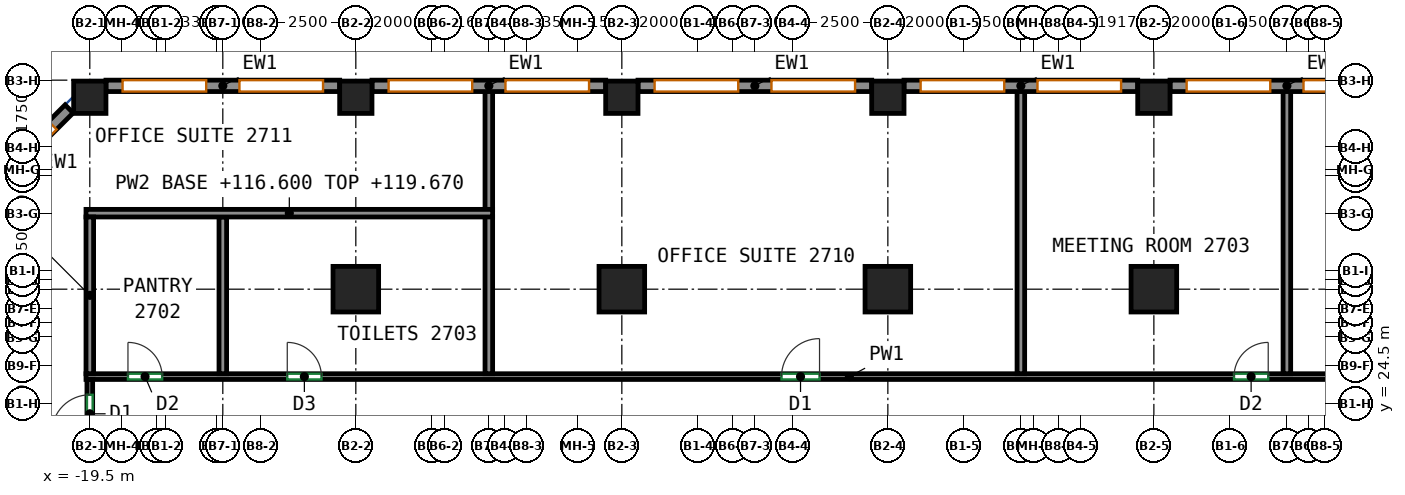
"""IFC4 building model, lengths in metres.
Left out: names, types, materials, properties, quantities, classifications, styles, units other than length and angle.
Written with IfcOpenShell. Run it as: python <this file> out.ifc"""

import sys

from ifc_helpers import new_model, si_unit, direction, frame, frame_2d, origin, origin_2d, place, context, subcontext, project, spatial, rectangle, extrude, source, transform, mapped, element, fill, save


model = new_model("IFC4")
c1 = context("Model", 3, precision=1e-05, world=origin(), true_north=direction((0.0, 1.0)))
c2 = subcontext(c1, "Body", "Model", "MODEL_VIEW")
j1 = project(units=[si_unit("LENGTHUNIT", "METRE"), si_unit("PLANEANGLEUNIT", "RADIAN")], contexts=[c1])
p1 = place(None, origin())
s1 = spatial("IfcSite", under=j1, at=p1, CompositionType="ELEMENT")
p2 = place(p1, origin())
s2 = spatial("IfcBuilding", under=s1, at=p2, CompositionType="ELEMENT")
p3 = place(p2, frame((0.0, 0.0, 116.6)))
s3 = spatial("IfcBuildingStorey", under=s2, at=p3, CompositionType="ELEMENT", Elevation=116.6)
m1 = source(origin(), c2, "Body", "SweptSolid", [
    extrude(rectangle(XDim=0.85, YDim=0.85, at=origin_2d()), origin(), (0.0, 0.0, 1.0), 3.72),
])
p4 = place(p3, frame((-19.5, 32.55, 0.0), z_axis=(0.0, 0.0, 1.0), x_axis=(1.0, 0.0, 0.0)))
e1 = element("IfcColumn", 1, at=p4, inside=s3, PredefinedType="COLUMN", context=c2, shape_type="MappedRepresentation", body=[
    mapped(m1, transform((0.0, 0.0, 0.0))),
])
m2 = source(origin(), c2, "Body", "SweptSolid", [
    extrude(rectangle(XDim=1.2, YDim=1.2, at=origin_2d()), origin(), (0.0, 0.0, 1.0), 3.72),
])
p5 = place(p3, frame((-12.5, 27.5, 0.0), z_axis=(0.0, 0.0, 1.0), x_axis=(1.0, 0.0, 0.0)))
e2 = element("IfcColumn", 2, at=p5, inside=s3, PredefinedType="COLUMN", context=c2, shape_type="MappedRepresentation", body=[
    mapped(m2, transform((0.0, 0.0, 0.0))),
])
p6 = place(p3, frame((-12.5, 32.55, 0.0), z_axis=(0.0, 0.0, 1.0), x_axis=(1.0, 0.0, 0.0)))
e3 = element("IfcColumn", 3, at=p6, inside=s3, PredefinedType="COLUMN", context=c2, shape_type="MappedRepresentation", body=[
    mapped(m1, transform((0.0, 0.0, 0.0))),
])
p7 = place(p3, frame((-5.5, 27.5, 0.0), z_axis=(0.0, 0.0, 1.0), x_axis=(1.0, 0.0, 0.0)))
e4 = element("IfcColumn", 4, at=p7, inside=s3, PredefinedType="COLUMN", context=c2, shape_type="MappedRepresentation", body=[
    mapped(m2, transform((0.0, 0.0, 0.0))),
])
p8 = place(p3, frame((-5.5, 32.55, 0.0), z_axis=(0.0, 0.0, 1.0), x_axis=(1.0, 0.0, 0.0)))
e5 = element("IfcColumn", 5, at=p8, inside=s3, PredefinedType="COLUMN", context=c2, shape_type="MappedRepresentation", body=[
    mapped(m1, transform((0.0, 0.0, 0.0))),
])
p9 = place(p3, frame((1.5, 27.5, 0.0), z_axis=(0.0, 0.0, 1.0), x_axis=(1.0, 0.0, 0.0)))
e6 = element("IfcColumn", 6, at=p9, inside=s3, PredefinedType="COLUMN", context=c2, shape_type="MappedRepresentation", body=[
    mapped(m2, transform((0.0, 0.0, 0.0))),
])
p10 = place(p3, frame((1.5, 32.55, 0.0), z_axis=(0.0, 0.0, 1.0), x_axis=(1.0, 0.0, 0.0)))
e7 = element("IfcColumn", 7, at=p10, inside=s3, PredefinedType="COLUMN", context=c2, shape_type="MappedRepresentation", body=[
    mapped(m1, transform((0.0, 0.0, 0.0))),
])
p11 = place(p3, frame((8.5, 27.5, 0.0), z_axis=(0.0, 0.0, 1.0), x_axis=(1.0, 0.0, 0.0)))
e8 = element("IfcColumn", 8, at=p11, inside=s3, PredefinedType="COLUMN", context=c2, shape_type="MappedRepresentation", body=[
    mapped(m2, transform((0.0, 0.0, 0.0))),
])
p12 = place(p3, frame((8.5, 32.55, 0.0), z_axis=(0.0, 0.0, 1.0), x_axis=(1.0, 0.0, 0.0)))
e9 = element("IfcColumn", 9, at=p12, inside=s3, PredefinedType="COLUMN", context=c2, shape_type="MappedRepresentation", body=[
    mapped(m1, transform((0.0, 0.0, 0.0))),
])
m3 = source(origin(), c2, "Body", "SweptSolid", [
    extrude(rectangle(XDim=6.15, YDim=0.3, at=frame_2d((3.075, 0.0))), origin(), (0.0, 0.0, 1.0), 3.72),
])
p13 = place(p3, frame((15.075, 32.85, 0.0), z_axis=(0.0, 0.0, 1.0), x_axis=(-1.0, 0.0, 0.0)))
e10 = element("IfcWall", 10, at=p13, inside=s3, PredefinedType="SOLIDWALL", context=c2, shape_type="MappedRepresentation", body=[
    mapped(m3, transform((0.0, 0.0, 0.0))),
])
p14 = place(p13, frame((0.438, 0.0, 0.7)))
e11 = element("IfcOpeningElement", 11, at=p14, cuts=e10, PredefinedType="OPENING", context=c2, shape_type="SweptSolid", body=[
    extrude(rectangle(XDim=2.2, YDim=2.25, at=frame_2d((1.1, 1.125))), frame((0.0, 0.16, 0.0), z_axis=(0.0, -1.0, 0.0), x_axis=(1.0, 0.0, 0.0)), (0.0, 0.0, 1.0), 0.32),
])
p15 = place(p13, frame((3.512, 0.0, 0.7)))
e12 = element("IfcOpeningElement", 12, at=p15, cuts=e10, PredefinedType="OPENING", context=c2, shape_type="SweptSolid", body=[
    extrude(rectangle(XDim=2.2, YDim=2.25, at=frame_2d((1.1, 1.125))), frame((0.0, 0.16, 0.0), z_axis=(0.0, -1.0, 0.0), x_axis=(1.0, 0.0, 0.0)), (0.0, 0.0, 1.0), 0.32),
])
p16 = place(p3, frame((8.075, 32.85, 0.0), z_axis=(0.0, 0.0, 1.0), x_axis=(-1.0, 0.0, 0.0)))
e13 = element("IfcWall", 13, at=p16, inside=s3, PredefinedType="SOLIDWALL", context=c2, shape_type="MappedRepresentation", body=[
    mapped(m3, transform((0.0, 0.0, 0.0))),
])
p17 = place(p16, frame((0.438, 0.0, 0.7)))
e14 = element("IfcOpeningElement", 14, at=p17, cuts=e13, PredefinedType="OPENING", context=c2, shape_type="SweptSolid", body=[
    extrude(rectangle(XDim=2.2, YDim=2.25, at=frame_2d((1.1, 1.125))), frame((0.0, 0.16, 0.0), z_axis=(0.0, -1.0, 0.0), x_axis=(1.0, 0.0, 0.0)), (0.0, 0.0, 1.0), 0.32),
])
p18 = place(p16, frame((3.512, 0.0, 0.7)))
e15 = element("IfcOpeningElement", 15, at=p18, cuts=e13, PredefinedType="OPENING", context=c2, shape_type="SweptSolid", body=[
    extrude(rectangle(XDim=2.2, YDim=2.25, at=frame_2d((1.1, 1.125))), frame((0.0, 0.16, 0.0), z_axis=(0.0, -1.0, 0.0), x_axis=(1.0, 0.0, 0.0)), (0.0, 0.0, 1.0), 0.32),
])
p19 = place(p3, frame((1.075, 32.85, 0.0), z_axis=(0.0, 0.0, 1.0), x_axis=(-1.0, 0.0, 0.0)))
e16 = element("IfcWall", 16, at=p19, inside=s3, PredefinedType="SOLIDWALL", context=c2, shape_type="MappedRepresentation", body=[
    mapped(m3, transform((0.0, 0.0, 0.0))),
])
p20 = place(p19, frame((0.438, 0.0, 0.7)))
e17 = element("IfcOpeningElement", 17, at=p20, cuts=e16, PredefinedType="OPENING", context=c2, shape_type="SweptSolid", body=[
    extrude(rectangle(XDim=2.2, YDim=2.25, at=frame_2d((1.1, 1.125))), frame((0.0, 0.16, 0.0), z_axis=(0.0, -1.0, 0.0), x_axis=(1.0, 0.0, 0.0)), (0.0, 0.0, 1.0), 0.32),
])
p21 = place(p19, frame((3.512, 0.0, 0.7)))
e18 = element("IfcOpeningElement", 18, at=p21, cuts=e16, PredefinedType="OPENING", context=c2, shape_type="SweptSolid", body=[
    extrude(rectangle(XDim=2.2, YDim=2.25, at=frame_2d((1.1, 1.125))), frame((0.0, 0.16, 0.0), z_axis=(0.0, -1.0, 0.0), x_axis=(1.0, 0.0, 0.0)), (0.0, 0.0, 1.0), 0.32),
])
p22 = place(p3, frame((-5.925, 32.85, 0.0), z_axis=(0.0, 0.0, 1.0), x_axis=(-1.0, 0.0, 0.0)))
e19 = element("IfcWall", 19, at=p22, inside=s3, PredefinedType="SOLIDWALL", context=c2, shape_type="MappedRepresentation", body=[
    mapped(m3, transform((0.0, 0.0, 0.0))),
])
p23 = place(p22, frame((0.438, 0.0, 0.7)))
e20 = element("IfcOpeningElement", 20, at=p23, cuts=e19, PredefinedType="OPENING", context=c2, shape_type="SweptSolid", body=[
    extrude(rectangle(XDim=2.2, YDim=2.25, at=frame_2d((1.1, 1.125))), frame((0.0, 0.16, 0.0), z_axis=(0.0, -1.0, 0.0), x_axis=(1.0, 0.0, 0.0)), (0.0, 0.0, 1.0), 0.32),
])
p24 = place(p22, frame((3.512, 0.0, 0.7)))
e21 = element("IfcOpeningElement", 21, at=p24, cuts=e19, PredefinedType="OPENING", context=c2, shape_type="SweptSolid", body=[
    extrude(rectangle(XDim=2.2, YDim=2.25, at=frame_2d((1.1, 1.125))), frame((0.0, 0.16, 0.0), z_axis=(0.0, -1.0, 0.0), x_axis=(1.0, 0.0, 0.0)), (0.0, 0.0, 1.0), 0.32),
])
p25 = place(p3, frame((-12.925, 32.85, 0.0), z_axis=(0.0, 0.0, 1.0), x_axis=(-1.0, 0.0, 0.0)))
e22 = element("IfcWall", 22, at=p25, inside=s3, PredefinedType="SOLIDWALL", context=c2, shape_type="MappedRepresentation", body=[
    mapped(m3, transform((0.0, 0.0, 0.0))),
])
p26 = place(p25, frame((0.438, 0.0, 0.7)))
e23 = element("IfcOpeningElement", 23, at=p26, cuts=e22, PredefinedType="OPENING", context=c2, shape_type="SweptSolid", body=[
    extrude(rectangle(XDim=2.2, YDim=2.25, at=frame_2d((1.1, 1.125))), frame((0.0, 0.16, 0.0), z_axis=(0.0, -1.0, 0.0), x_axis=(1.0, 0.0, 0.0)), (0.0, 0.0, 1.0), 0.32),
])
p27 = place(p25, frame((3.512, 0.0, 0.7)))
e24 = element("IfcOpeningElement", 24, at=p27, cuts=e22, PredefinedType="OPENING", context=c2, shape_type="SweptSolid", body=[
    extrude(rectangle(XDim=2.2, YDim=2.25, at=frame_2d((1.1, 1.125))), frame((0.0, 0.16, 0.0), z_axis=(0.0, -1.0, 0.0), x_axis=(1.0, 0.0, 0.0)), (0.0, 0.0, 1.0), 0.32),
])
m4 = source(origin(), c2, "Body", "SweptSolid", [
    extrude(rectangle(XDim=3.429, YDim=0.3, at=frame_2d((1.715, 0.0))), origin(), (0.0, 0.0, 1.0), 3.72),
])
p28 = place(p3, frame((-20.044, 32.244, 0.0), z_axis=(0.0, 0.0, 1.0), x_axis=(-0.707106781187, -0.707106781187, 0.0)))
e25 = element("IfcWall", 25, at=p28, inside=s3, PredefinedType="SOLIDWALL", context=c2, shape_type="MappedRepresentation", body=[
    mapped(m4, transform((0.0, 0.0, 0.0))),
])
p29 = place(p28, frame((0.615, 0.0, 0.7)))
e26 = element("IfcOpeningElement", 26, at=p29, cuts=e25, PredefinedType="OPENING", context=c2, shape_type="SweptSolid", body=[
    extrude(rectangle(XDim=2.2, YDim=2.25, at=frame_2d((1.1, 1.125))), frame((0.0, 0.16, 0.0), z_axis=(0.0, -1.0, 0.0), x_axis=(1.0, 0.0, 0.0)), (0.0, 0.0, 1.0), 0.32),
])
p30 = place(p3, frame((-19.6, 25.2, 0.0), z_axis=(0.0, 0.0, 1.0), x_axis=(1.0, 0.0, 0.0)))
e27 = element("IfcWall", 27, at=p30, inside=s3, PredefinedType="PARTITIONING", context=c2, shape_type="SweptSolid", body=[
    extrude(rectangle(XDim=40.175, YDim=0.15, at=frame_2d((20.087, 0.0))), origin(), (0.0, 0.0, 1.0), 3.72),
])
p31 = place(p30, frame((1.104, 0.0, 0.0)))
e28 = element("IfcOpeningElement", 28, at=p31, cuts=e27, PredefinedType="OPENING", context=c2, shape_type="SweptSolid", body=[
    extrude(rectangle(XDim=0.9, YDim=2.1, at=frame_2d((0.45, 1.05))), frame((0.0, 0.085, 0.0), z_axis=(0.0, -1.0, 0.0), x_axis=(1.0, 0.0, 0.0)), (0.0, 0.0, 1.0), 0.17),
])
p32 = place(p30, frame((5.296, 0.0, 0.0)))
e29 = element("IfcOpeningElement", 29, at=p32, cuts=e27, PredefinedType="OPENING", context=c2, shape_type="SweptSolid", body=[
    extrude(rectangle(XDim=0.9, YDim=2.1, at=frame_2d((0.45, 1.05))), frame((0.0, 0.085, 0.0), z_axis=(0.0, -1.0, 0.0), x_axis=(1.0, 0.0, 0.0)), (0.0, 0.0, 1.0), 0.17),
])
p33 = place(p30, frame((18.302, 0.0, 0.0)))
e30 = element("IfcOpeningElement", 30, at=p33, cuts=e27, PredefinedType="OPENING", context=c2, shape_type="SweptSolid", body=[
    extrude(rectangle(XDim=1.0, YDim=2.1, at=frame_2d((0.5, 1.05))), frame((0.0, 0.085, 0.0), z_axis=(0.0, -1.0, 0.0), x_axis=(1.0, 0.0, 0.0)), (0.0, 0.0, 1.0), 0.17),
])
p34 = place(p30, frame((30.209, 0.0, 0.0)))
e31 = element("IfcOpeningElement", 31, at=p34, cuts=e27, PredefinedType="OPENING", context=c2, shape_type="SweptSolid", body=[
    extrude(rectangle(XDim=0.9, YDim=2.1, at=frame_2d((0.45, 1.05))), frame((0.0, 0.085, 0.0), z_axis=(0.0, -1.0, 0.0), x_axis=(1.0, 0.0, 0.0)), (0.0, 0.0, 1.0), 0.17),
])
p35 = place(p30, frame((32.702, 0.0, 0.0)))
e32 = element("IfcOpeningElement", 32, at=p35, cuts=e27, PredefinedType="OPENING", context=c2, shape_type="SweptSolid", body=[
    extrude(rectangle(XDim=1.8, YDim=2.1, at=frame_2d((0.9, 1.05))), frame((0.0, 0.085, 0.0), z_axis=(0.0, -1.0, 0.0), x_axis=(1.0, 0.0, 0.0)), (0.0, 0.0, 1.0), 0.17),
])
p36 = place(p3, frame((-19.5, 22.09, 0.0), z_axis=(0.0, 0.0, 1.0), x_axis=(0.0, 1.0, 0.0)))
e33 = element("IfcWall", 33, at=p36, inside=s3, PredefinedType="PARTITIONING", context=c2, shape_type="SweptSolid", body=[
    extrude(rectangle(XDim=3.035, YDim=0.15, at=frame_2d((1.518, 0.0))), origin(), (0.0, 0.0, 1.0), 3.07),
])
p37 = place(p36, frame((1.631, 0.0, 0.0)))
e34 = element("IfcOpeningElement", 34, at=p37, cuts=e33, PredefinedType="OPENING", context=c2, shape_type="SweptSolid", body=[
    extrude(rectangle(XDim=1.0, YDim=2.1, at=frame_2d((0.5, 1.05))), frame((0.0, 0.085, 0.0), z_axis=(0.0, -1.0, 0.0), x_axis=(1.0, 0.0, 0.0)), (0.0, 0.0, 1.0), 0.17),
])
for number, where, z_axis, x_axis in (
    (35, (12.0, 25.276, 0.0), (0.0, 0.0, 1.0), (0.0, 1.0, 0.0)),
    (36, (5.0, 25.276, 0.0), (0.0, 0.0, 1.0), (0.0, 1.0, 0.0)),
):
    element("IfcWall", number, at=place(p3, frame(where, z_axis=z_axis, x_axis=x_axis)), inside=s3, PredefinedType="PARTITIONING", context=c2, shape_type="SweptSolid", body=[
        extrude(rectangle(XDim=7.474, YDim=0.2, at=frame_2d((3.737, 0.0))), origin(), (0.0, 0.0, 1.0), 3.72),
    ])
p38 = place(p3, frame((-9.0, 25.276, 0.0), z_axis=(0.0, 0.0, 1.0), x_axis=(0.0, 1.0, 0.0)))
e37 = element("IfcWall", 37, at=p38, inside=s3, PredefinedType="PARTITIONING", context=c2, shape_type="SweptSolid", body=[
    extrude(rectangle(XDim=4.134, YDim=0.2, at=frame_2d((2.067, 0.0))), origin(), (0.0, 0.0, 1.0), 3.72),
])
p39 = place(p3, frame((-9.0, 29.59, 0.0), z_axis=(0.0, 0.0, 1.0), x_axis=(0.0, 1.0, 0.0)))
e38 = element("IfcWall", 38, at=p39, inside=s3, PredefinedType="PARTITIONING", context=c2, shape_type="SweptSolid", body=[
    extrude(rectangle(XDim=3.16, YDim=0.2, at=frame_2d((1.58, 0.0))), origin(), (0.0, 0.0, 1.0), 3.72),
])
p40 = place(p3, frame((-16.0, 29.4, 0.0), z_axis=(0.0, 0.0, 1.0), x_axis=(0.0, -1.0, 0.0)))
e39 = element("IfcWall", 39, at=p40, inside=s3, PredefinedType="PARTITIONING", context=c2, shape_type="SweptSolid", body=[
    extrude(rectangle(XDim=4.124, YDim=0.2, at=frame_2d((2.062, 0.0))), origin(), (0.0, 0.0, 1.0), 3.72),
])
p41 = place(p3, frame((-19.6, 29.5, 0.0), z_axis=(0.0, 0.0, 1.0), x_axis=(1.0, 0.0, 0.0)))
e40 = element("IfcWall", 40, at=p41, inside=s3, PredefinedType="PARTITIONING", context=c2, shape_type="SweptSolid", body=[
    extrude(rectangle(XDim=10.7, YDim=0.2, at=frame_2d((5.35, 0.0))), origin(), (0.0, 0.0, 1.0), 3.07),
])
p42 = place(p3, frame((-19.5, 29.4, 0.0), z_axis=(0.0, 0.0, 1.0), x_axis=(0.0, -1.0, 0.0)))
e41 = element("IfcWall", 41, at=p42, inside=s3, PredefinedType="PARTITIONING", context=c2, shape_type="SweptSolid", body=[
    extrude(rectangle(XDim=4.124, YDim=0.2, at=frame_2d((2.062, 0.0))), origin(), (0.0, 0.0, 1.0), 3.07),
])
p43 = place(p14, origin())
e42 = element("IfcWindow", 42, at=p43, inside=s3, PartitioningType="SINGLE_PANEL", PredefinedType="WINDOW", context=c2, shape_type="SweptSolid", body=[
    extrude(rectangle(XDim=2.2, YDim=2.25, at=frame_2d((1.1, 1.125))), frame((0.0, 0.03, 0.0), z_axis=(0.0, -1.0, 0.0), x_axis=(1.0, 0.0, 0.0)), (0.0, 0.0, 1.0), 0.06),
])
fill(e11, e42)
p44 = place(p15, origin())
e43 = element("IfcWindow", 43, at=p44, inside=s3, PartitioningType="SINGLE_PANEL", PredefinedType="WINDOW", context=c2, shape_type="SweptSolid", body=[
    extrude(rectangle(XDim=2.2, YDim=2.25, at=frame_2d((1.1, 1.125))), frame((0.0, 0.03, 0.0), z_axis=(0.0, -1.0, 0.0), x_axis=(1.0, 0.0, 0.0)), (0.0, 0.0, 1.0), 0.06),
])
fill(e12, e43)
p45 = place(p17, origin())
e44 = element("IfcWindow", 44, at=p45, inside=s3, PartitioningType="SINGLE_PANEL", PredefinedType="WINDOW", context=c2, shape_type="SweptSolid", body=[
    extrude(rectangle(XDim=2.2, YDim=2.25, at=frame_2d((1.1, 1.125))), frame((0.0, 0.03, 0.0), z_axis=(0.0, -1.0, 0.0), x_axis=(1.0, 0.0, 0.0)), (0.0, 0.0, 1.0), 0.06),
])
fill(e14, e44)
p46 = place(p18, origin())
e45 = element("IfcWindow", 45, at=p46, inside=s3, PartitioningType="SINGLE_PANEL", PredefinedType="WINDOW", context=c2, shape_type="SweptSolid", body=[
    extrude(rectangle(XDim=2.2, YDim=2.25, at=frame_2d((1.1, 1.125))), frame((0.0, 0.03, 0.0), z_axis=(0.0, -1.0, 0.0), x_axis=(1.0, 0.0, 0.0)), (0.0, 0.0, 1.0), 0.06),
])
fill(e15, e45)
p47 = place(p20, origin())
e46 = element("IfcWindow", 46, at=p47, inside=s3, PartitioningType="SINGLE_PANEL", PredefinedType="WINDOW", context=c2, shape_type="SweptSolid", body=[
    extrude(rectangle(XDim=2.2, YDim=2.25, at=frame_2d((1.1, 1.125))), frame((0.0, 0.03, 0.0), z_axis=(0.0, -1.0, 0.0), x_axis=(1.0, 0.0, 0.0)), (0.0, 0.0, 1.0), 0.06),
])
fill(e17, e46)
p48 = place(p21, origin())
e47 = element("IfcWindow", 47, at=p48, inside=s3, PartitioningType="SINGLE_PANEL", PredefinedType="WINDOW", context=c2, shape_type="SweptSolid", body=[
    extrude(rectangle(XDim=2.2, YDim=2.25, at=frame_2d((1.1, 1.125))), frame((0.0, 0.03, 0.0), z_axis=(0.0, -1.0, 0.0), x_axis=(1.0, 0.0, 0.0)), (0.0, 0.0, 1.0), 0.06),
])
fill(e18, e47)
p49 = place(p23, origin())
e48 = element("IfcWindow", 48, at=p49, inside=s3, PartitioningType="SINGLE_PANEL", PredefinedType="WINDOW", context=c2, shape_type="SweptSolid", body=[
    extrude(rectangle(XDim=2.2, YDim=2.25, at=frame_2d((1.1, 1.125))), frame((0.0, 0.03, 0.0), z_axis=(0.0, -1.0, 0.0), x_axis=(1.0, 0.0, 0.0)), (0.0, 0.0, 1.0), 0.06),
])
fill(e20, e48)
p50 = place(p24, origin())
e49 = element("IfcWindow", 49, at=p50, inside=s3, PartitioningType="SINGLE_PANEL", PredefinedType="WINDOW", context=c2, shape_type="SweptSolid", body=[
    extrude(rectangle(XDim=2.2, YDim=2.25, at=frame_2d((1.1, 1.125))), frame((0.0, 0.03, 0.0), z_axis=(0.0, -1.0, 0.0), x_axis=(1.0, 0.0, 0.0)), (0.0, 0.0, 1.0), 0.06),
])
fill(e21, e49)
p51 = place(p26, origin())
e50 = element("IfcWindow", 50, at=p51, inside=s3, PartitioningType="SINGLE_PANEL", PredefinedType="WINDOW", context=c2, shape_type="SweptSolid", body=[
    extrude(rectangle(XDim=2.2, YDim=2.25, at=frame_2d((1.1, 1.125))), frame((0.0, 0.03, 0.0), z_axis=(0.0, -1.0, 0.0), x_axis=(1.0, 0.0, 0.0)), (0.0, 0.0, 1.0), 0.06),
])
fill(e23, e50)
p52 = place(p27, origin())
e51 = element("IfcWindow", 51, at=p52, inside=s3, PartitioningType="SINGLE_PANEL", PredefinedType="WINDOW", context=c2, shape_type="SweptSolid", body=[
    extrude(rectangle(XDim=2.2, YDim=2.25, at=frame_2d((1.1, 1.125))), frame((0.0, 0.03, 0.0), z_axis=(0.0, -1.0, 0.0), x_axis=(1.0, 0.0, 0.0)), (0.0, 0.0, 1.0), 0.06),
])
fill(e24, e51)
p53 = place(p29, origin())
e52 = element("IfcWindow", 52, at=p53, inside=s3, PartitioningType="SINGLE_PANEL", PredefinedType="WINDOW", context=c2, shape_type="SweptSolid", body=[
    extrude(rectangle(XDim=2.2, YDim=2.25, at=frame_2d((1.1, 1.125))), frame((0.0, 0.03, 0.0), z_axis=(0.0, -1.0, 0.0), x_axis=(1.0, 0.0, 0.0)), (0.0, 0.0, 1.0), 0.06),
])
fill(e26, e52)
p54 = place(p37, origin())
e53 = element("IfcDoor", 53, at=p54, inside=s3, OperationType="SINGLE_SWING_LEFT", PredefinedType="DOOR", context=c2, shape_type="SweptSolid", body=[
    extrude(rectangle(XDim=1.0, YDim=2.1, at=frame_2d((0.5, 1.05))), frame((0.0, 0.025, 0.0), z_axis=(0.0, -1.0, 0.0), x_axis=(1.0, 0.0, 0.0)), (0.0, 0.0, 1.0), 0.05),
])
fill(e34, e53)
p55 = place(p31, origin())
e54 = element("IfcDoor", 54, at=p55, inside=s3, OperationType="SINGLE_SWING_LEFT", PredefinedType="DOOR", context=c2, shape_type="SweptSolid", body=[
    extrude(rectangle(XDim=0.9, YDim=2.1, at=frame_2d((0.45, 1.05))), frame((0.0, 0.025, 0.0), z_axis=(0.0, -1.0, 0.0), x_axis=(1.0, 0.0, 0.0)), (0.0, 0.0, 1.0), 0.05),
])
fill(e28, e54)
p56 = place(p32, origin())
e55 = element("IfcDoor", 55, at=p56, inside=s3, OperationType="SINGLE_SWING_LEFT", PredefinedType="DOOR", context=c2, shape_type="SweptSolid", body=[
    extrude(rectangle(XDim=0.9, YDim=2.1, at=frame_2d((0.45, 1.05))), frame((0.0, 0.025, 0.0), z_axis=(0.0, -1.0, 0.0), x_axis=(1.0, 0.0, 0.0)), (0.0, 0.0, 1.0), 0.05),
])
fill(e29, e55)
p57 = place(p33, origin())
e56 = element("IfcDoor", 56, at=p57, inside=s3, OperationType="SINGLE_SWING_RIGHT", PredefinedType="DOOR", context=c2, shape_type="SweptSolid", body=[
    extrude(rectangle(XDim=1.0, YDim=2.1, at=frame_2d((0.5, 1.05))), frame((0.0, 0.025, 0.0), z_axis=(0.0, -1.0, 0.0), x_axis=(1.0, 0.0, 0.0)), (0.0, 0.0, 1.0), 0.05),
])
fill(e30, e56)
p58 = place(p34, origin())
e57 = element("IfcDoor", 57, at=p58, inside=s3, OperationType="SINGLE_SWING_RIGHT", PredefinedType="DOOR", context=c2, shape_type="SweptSolid", body=[
    extrude(rectangle(XDim=0.9, YDim=2.1, at=frame_2d((0.45, 1.05))), frame((0.0, 0.025, 0.0), z_axis=(0.0, -1.0, 0.0), x_axis=(1.0, 0.0, 0.0)), (0.0, 0.0, 1.0), 0.05),
])
fill(e31, e57)
save(model, sys.argv[1])
